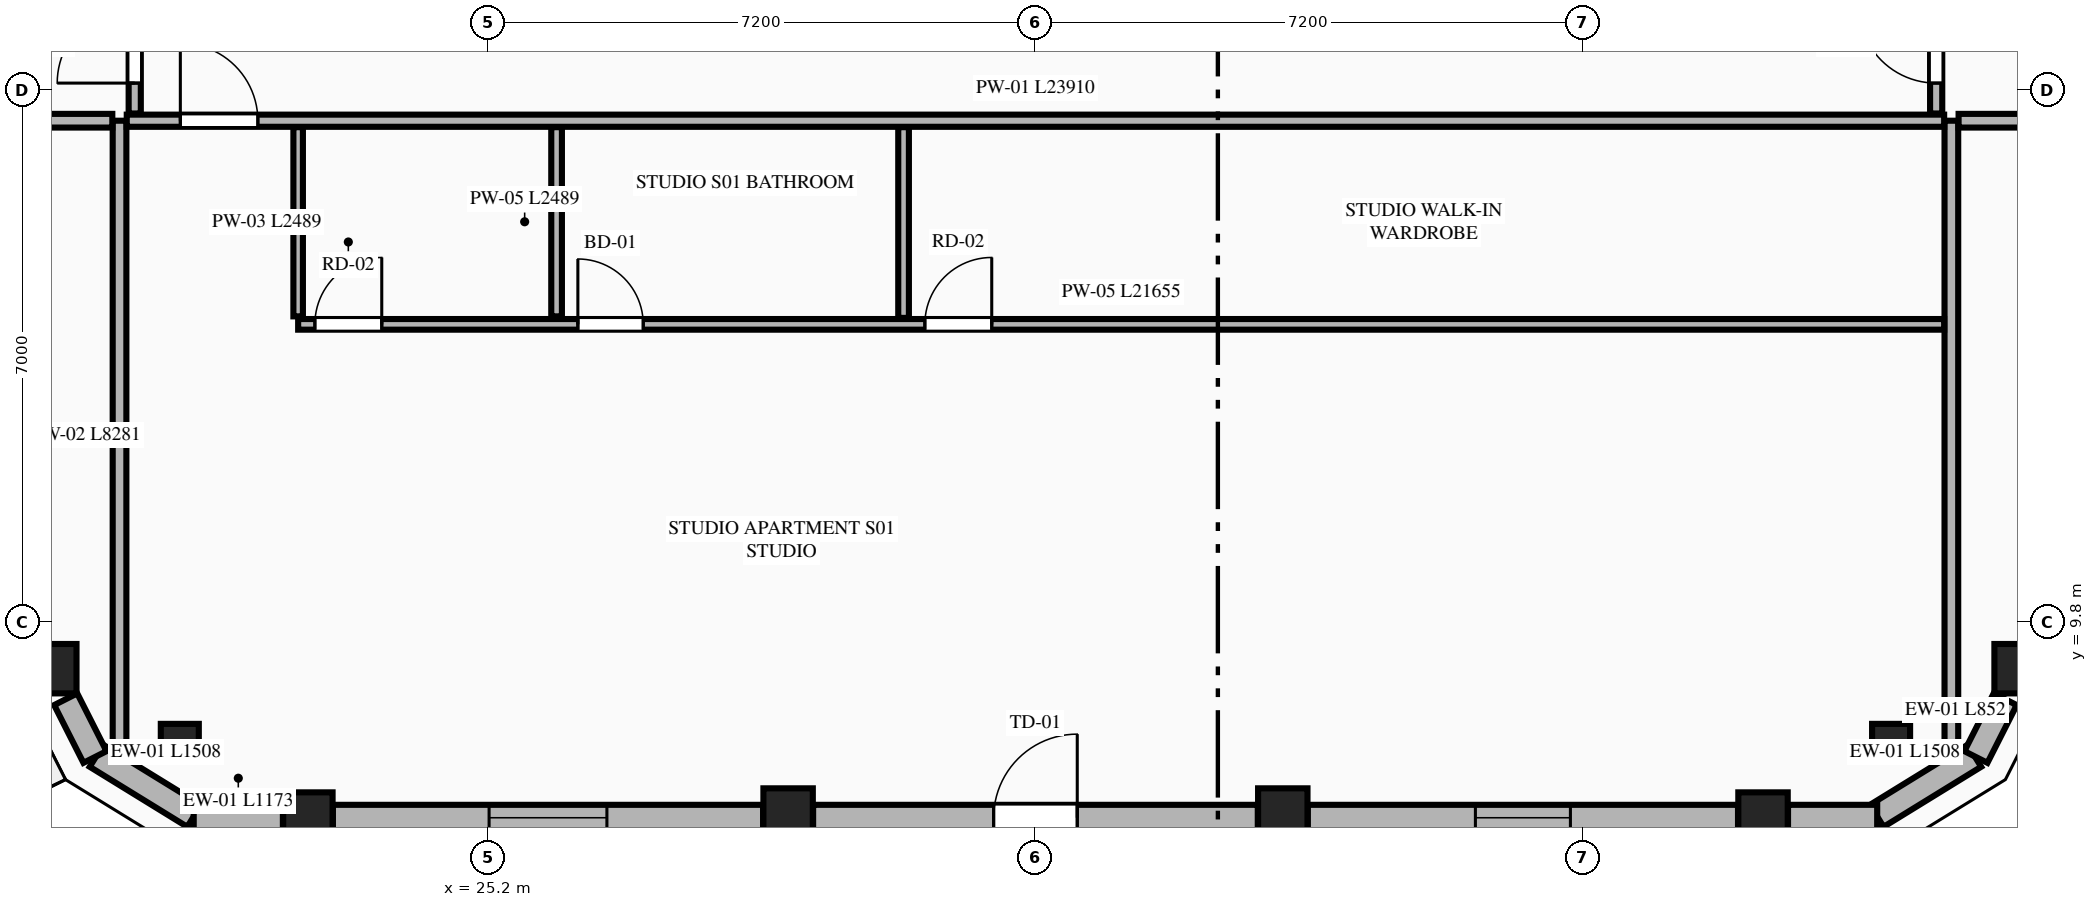
"""IFC4 building model, lengths in metres.
Left out: names, types, materials, properties, quantities, classifications, styles, units other than length and angle.
Written with IfcOpenShell. Run it as: python <this file> out.ifc"""

import sys

from ifc_helpers import new_model, si_unit, direction, frame, frame_2d, origin, origin_2d, place, context, subcontext, project, spatial, rectangle, extrude, element, fill, save


model = new_model("IFC4")
c1 = context("Model", 3, precision=1e-05, world=origin(), true_north=direction((0.0, 1.0)))
c2 = subcontext(c1, "Body", "Model", "MODEL_VIEW")
j1 = project(units=[si_unit("LENGTHUNIT", "METRE"), si_unit("PLANEANGLEUNIT", "RADIAN")], contexts=[c1])
p1 = place(None, origin())
s1 = spatial("IfcSite", under=j1, at=p1, CompositionType="ELEMENT")
p2 = place(p1, origin())
s2 = spatial("IfcBuilding", under=s1, at=p2, CompositionType="ELEMENT")
p3 = place(p2, frame((0.0, 0.0, 263.5)))
s3 = spatial("IfcBuildingStorey", under=s2, at=p3, CompositionType="ELEMENT", Elevation=263.5)
for number, where, z_axis, x_axis in (
    (1, (22.828, 7.239, 0.0), (0.0, 0.0, 1.0), (1.0, 0.0, 0.0)),
    (2, (29.146, 7.292, 0.0), (0.0, 0.0, 1.0), (1.0, 0.0, 0.0)),
    (3, (35.654, 7.292, 0.0), (0.0, 0.0, 1.0), (1.0, 0.0, 0.0)),
    (4, (41.972, 7.239, 0.0), (0.0, 0.0, 1.0), (1.0, 0.0, 0.0)),
    (5, (45.341, 9.191, 0.0), (0.0, 0.0, 1.0), (1.0, 0.0, 0.0)),
    (6, (19.459, 9.191, 0.0), (0.0, 0.0, 1.0), (1.0, 0.0, 0.0)),
):
    element("IfcColumn", number, at=place(p3, frame(where, z_axis=z_axis, x_axis=x_axis)), inside=s3, PredefinedType="COLUMN", context=c2, shape_type="SweptSolid", body=[
        extrude(rectangle(XDim=0.65, YDim=0.65, at=origin_2d()), origin(), (0.0, 0.0, 1.0), 3.65),
    ])
for number, where, z_axis, x_axis in (
    (7, (21.143, 8.215, 0.0), (0.0, 0.0, 1.0), (0.865, -0.501, 0.0)),
    (8, (43.657, 8.215, 0.0), (0.0, 0.0, 1.0), (0.865, 0.501, 0.0)),
):
    element("IfcColumn", number, at=place(p3, frame(where, z_axis=z_axis, x_axis=x_axis)), inside=s3, PredefinedType="PILASTER", context=c2, shape_type="SweptSolid", body=[
        extrude(rectangle(XDim=0.5, YDim=0.35, at=origin_2d()), origin(), (0.0, 0.0, 1.0), 3.65),
    ])
for number, where, z_axis, x_axis in (
    (9, (20.047, 8.045, 0.0), (0.0, 0.0, 1.0), (0.852, -0.524, 0.0)),
    (10, (43.469, 7.255, 0.0), (0.0, 0.0, 1.0), (0.852, 0.524, 0.0)),
):
    element("IfcWall", number, at=place(p3, frame(where, z_axis=z_axis, x_axis=x_axis)), inside=s3, PredefinedType="STANDARD", context=c2, shape_type="SweptSolid", body=[
        extrude(rectangle(XDim=1.508, YDim=0.34, at=frame_2d((0.754, 0.0))), origin(), (0.0, 0.0, 1.0), 3.45),
    ])
p4 = place(p3, frame((21.326, 7.23, 0.0), z_axis=(0.0, 0.0, 1.0), x_axis=(1.0, 0.0, 0.0)))
e11 = element("IfcWall", 11, at=p4, inside=s3, PredefinedType="STANDARD", context=c2, shape_type="SweptSolid", body=[
    extrude(rectangle(XDim=1.173, YDim=0.34, at=frame_2d((0.586, 0.0))), origin(), (0.0, 0.0, 1.0), 3.45),
])
p5 = place(p3, frame((23.157, 7.23, 0.0), z_axis=(0.0, 0.0, 1.0), x_axis=(1.0, 0.0, 0.0)))
e12 = element("IfcWall", 12, at=p5, inside=s3, PredefinedType="STANDARD", context=c2, shape_type="SweptSolid", body=[
    extrude(rectangle(XDim=5.66, YDim=0.34, at=frame_2d((2.83, 0.0))), origin(), (0.0, 0.0, 1.0), 2.983),
])
p6 = place(p5, frame((2.055, 0.0, 0.75)))
e13 = element("IfcOpeningElement", 13, at=p6, cuts=e12, PredefinedType="OPENING", context=c2, shape_type="SweptSolid", body=[
    extrude(rectangle(XDim=1.55, YDim=2.05, at=frame_2d((0.775, 1.025))), frame((0.0, 0.18, 0.0), z_axis=(0.0, -1.0, 0.0), x_axis=(1.0, 0.0, 0.0)), (0.0, 0.0, 1.0), 0.36),
])
p7 = place(p3, frame((29.475, 7.23, 0.0), z_axis=(0.0, 0.0, 1.0), x_axis=(1.0, 0.0, 0.0)))
e14 = element("IfcWall", 14, at=p7, inside=s3, PredefinedType="STANDARD", context=c2, shape_type="SweptSolid", body=[
    extrude(rectangle(XDim=5.85, YDim=0.34, at=frame_2d((2.925, 0.0))), origin(), (0.0, 0.0, 1.0), 2.983),
])
p8 = place(p7, frame((2.375, 0.0, 0.0)))
e15 = element("IfcOpeningElement", 15, at=p8, cuts=e14, PredefinedType="OPENING", context=c2, shape_type="SweptSolid", body=[
    extrude(rectangle(XDim=1.1, YDim=2.25, at=frame_2d((0.55, 1.125))), frame((0.0, 0.18, 0.0), z_axis=(0.0, -1.0, 0.0), x_axis=(1.0, 0.0, 0.0)), (0.0, 0.0, 1.0), 0.36),
])
p9 = place(p3, frame((35.983, 7.23, 0.0), z_axis=(0.0, 0.0, 1.0), x_axis=(1.0, 0.0, 0.0)))
e16 = element("IfcWall", 16, at=p9, inside=s3, PredefinedType="STANDARD", context=c2, shape_type="SweptSolid", body=[
    extrude(rectangle(XDim=5.66, YDim=0.34, at=frame_2d((2.83, 0.0))), origin(), (0.0, 0.0, 1.0), 2.983),
])
p10 = place(p9, frame((2.205, 0.0, 0.75)))
e17 = element("IfcOpeningElement", 17, at=p10, cuts=e16, PredefinedType="OPENING", context=c2, shape_type="SweptSolid", body=[
    extrude(rectangle(XDim=1.25, YDim=1.95, at=frame_2d((0.625, 0.975))), frame((0.0, 0.18, 0.0), z_axis=(0.0, -1.0, 0.0), x_axis=(1.0, 0.0, 0.0)), (0.0, 0.0, 1.0), 0.36),
])
p11 = place(p3, frame((42.301, 7.23, 0.0), z_axis=(0.0, 0.0, 1.0), x_axis=(1.0, 0.0, 0.0)))
e18 = element("IfcWall", 18, at=p11, inside=s3, PredefinedType="STANDARD", context=c2, shape_type="SweptSolid", body=[
    extrude(rectangle(XDim=1.173, YDim=0.34, at=frame_2d((0.586, 0.0))), origin(), (0.0, 0.0, 1.0), 3.45),
])
for number, where, z_axis, x_axis in (
    (19, (44.773, 8.029, 0.0), (0.0, 0.0, 1.0), (0.452, 0.892, 0.0)),
    (20, (19.642, 8.789, 0.0), (0.0, 0.0, 1.0), (0.452, -0.892, 0.0)),
):
    element("IfcWall", number, at=place(p3, frame(where, z_axis=z_axis, x_axis=x_axis)), inside=s3, PredefinedType="STANDARD", context=c2, shape_type="SweptSolid", body=[
        extrude(rectangle(XDim=0.852, YDim=0.34, at=frame_2d((0.426, 0.0))), origin(), (0.0, 0.0, 1.0), 3.45),
    ])
for number, where, z_axis, x_axis in (
    (21, (20.35, 8.119, 0.0), (0.0, 0.0, 1.0), (0.0, 1.0, 0.0)),
    (22, (44.45, 8.119, 0.0), (0.0, 0.0, 1.0), (0.0, 1.0, 0.0)),
):
    element("IfcWall", number, at=place(p3, frame(where, z_axis=z_axis, x_axis=x_axis)), inside=s3, PredefinedType="PARTITIONING", context=c2, shape_type="SweptSolid", body=[
        extrude(rectangle(XDim=8.281, YDim=0.18, at=frame_2d((4.141, 0.0))), origin(), (0.0, 0.0, 1.0), 3.45),
    ])
p12 = place(p3, frame((20.445, 16.4, 0.0), z_axis=(0.0, 0.0, 1.0), x_axis=(1.0, 0.0, 0.0)))
e23 = element("IfcWall", 23, at=p12, inside=s3, PredefinedType="PARTITIONING", context=c2, shape_type="SweptSolid", body=[
    extrude(rectangle(XDim=23.91, YDim=0.16, at=frame_2d((11.955, 0.0))), origin(), (0.0, 0.0, 1.0), 3.45),
])
p13 = place(p12, frame((0.705, 0.0, 0.0)))
e24 = element("IfcOpeningElement", 24, at=p13, cuts=e23, PredefinedType="OPENING", context=c2, shape_type="SweptSolid", body=[
    extrude(rectangle(XDim=1.02, YDim=2.25, at=frame_2d((0.51, 1.125))), frame((0.0, 0.09, 0.0), z_axis=(0.0, -1.0, 0.0), x_axis=(1.0, 0.0, 0.0)), (0.0, 0.0, 1.0), 0.18),
])
p14 = place(p3, frame((22.7, 13.826, 0.0), z_axis=(0.0, 0.0, 1.0), x_axis=(0.0, 1.0, 0.0)))
e25 = element("IfcWall", 25, at=p14, inside=s3, PredefinedType="PARTITIONING", context=c2, shape_type="SweptSolid", body=[
    extrude(rectangle(XDim=2.489, YDim=0.125, at=frame_2d((1.245, 0.0))), origin(), (0.0, 0.0, 1.0), 2.907),
])
p15 = place(p3, frame((22.7, 13.721, 0.0), z_axis=(0.0, 0.0, 1.0), x_axis=(1.0, 0.0, 0.0)))
e26 = element("IfcWall", 26, at=p15, inside=s3, PredefinedType="PLUMBINGWALL", context=c2, shape_type="SweptSolid", body=[
    extrude(rectangle(XDim=21.655, YDim=0.14, at=frame_2d((10.828, 0.0))), origin(), (0.0, 0.0, 1.0), 3.45),
])
p16 = place(p15, frame((3.68, 0.0, 0.0)))
e27 = element("IfcOpeningElement", 27, at=p16, cuts=e26, PredefinedType="OPENING", context=c2, shape_type="SweptSolid", body=[
    extrude(rectangle(XDim=0.86, YDim=2.1, at=frame_2d((0.43, 1.05))), frame((0.0, 0.08, 0.0), z_axis=(0.0, -1.0, 0.0), x_axis=(1.0, 0.0, 0.0)), (0.0, 0.0, 1.0), 0.16),
])
p17 = place(p15, frame((8.245, 0.0, 0.0)))
e28 = element("IfcOpeningElement", 28, at=p17, cuts=e26, PredefinedType="OPENING", context=c2, shape_type="SweptSolid", body=[
    extrude(rectangle(XDim=0.88, YDim=2.15, at=frame_2d((0.44, 1.075))), frame((0.0, 0.08, 0.0), z_axis=(0.0, -1.0, 0.0), x_axis=(1.0, 0.0, 0.0)), (0.0, 0.0, 1.0), 0.16),
])
p18 = place(p15, frame((0.22, 0.0, 0.0)))
e29 = element("IfcOpeningElement", 29, at=p18, cuts=e26, PredefinedType="OPENING", context=c2, shape_type="SweptSolid", body=[
    extrude(rectangle(XDim=0.88, YDim=2.15, at=frame_2d((0.44, 1.075))), frame((0.0, 0.08, 0.0), z_axis=(0.0, -1.0, 0.0), x_axis=(1.0, 0.0, 0.0)), (0.0, 0.0, 1.0), 0.16),
])
p19 = place(p3, frame((26.1, 13.826, 0.0), z_axis=(0.0, 0.0, 1.0), x_axis=(0.0, 1.0, 0.0)))
e30 = element("IfcWall", 30, at=p19, inside=s3, PredefinedType="PLUMBINGWALL", context=c2, shape_type="SweptSolid", body=[
    extrude(rectangle(XDim=2.489, YDim=0.14, at=frame_2d((1.245, 0.0))), origin(), (0.0, 0.0, 1.0), 3.45),
])
p20 = place(p3, frame((30.665, 13.806, 0.0), z_axis=(0.0, 0.0, 1.0), x_axis=(0.0, 1.0, 0.0)))
e31 = element("IfcWall", 31, at=p20, inside=s3, PredefinedType="PLUMBINGWALL", context=c2, shape_type="SweptSolid", body=[
    extrude(rectangle(XDim=2.509, YDim=0.14, at=frame_2d((1.254, 0.0))), origin(), (0.0, 0.0, 1.0), 3.45),
])
p21 = place(p3, frame((16.034, 16.4, 0.0), z_axis=(0.0, 0.0, 1.0), x_axis=(1.0, 0.0, 0.0)))
e32 = element("IfcWall", 32, at=p21, inside=s3, PredefinedType="PARTITIONING", context=c2, shape_type="SweptSolid", body=[
    extrude(rectangle(XDim=4.221, YDim=0.18, at=frame_2d((2.11, 0.0))), origin(), (0.0, 0.0, 1.0), 3.45),
])
p22 = place(p3, frame((44.545, 16.4, 0.0), z_axis=(0.0, 0.0, 1.0), x_axis=(1.0, 0.0, 0.0)))
e33 = element("IfcWall", 33, at=p22, inside=s3, PredefinedType="PARTITIONING", context=c2, shape_type="SweptSolid", body=[
    extrude(rectangle(XDim=4.221, YDim=0.18, at=frame_2d((2.111, 0.0))), origin(), (0.0, 0.0, 1.0), 3.45),
])
p23 = place(p3, frame((20.55, 16.495, 0.0), z_axis=(0.0, 0.0, 1.0), x_axis=(0.0, 1.0, 0.0)))
e34 = element("IfcWall", 34, at=p23, inside=s3, PredefinedType="PARTITIONING", context=c2, shape_type="SweptSolid", body=[
    extrude(rectangle(XDim=18.41, YDim=0.16, at=frame_2d((9.205, 0.0))), origin(), (0.0, 0.0, 1.0), 3.137),
])
p24 = place(p23, frame((0.4, 0.0, 0.0)))
e35 = element("IfcOpeningElement", 35, at=p24, cuts=e34, PredefinedType="OPENING", context=c2, shape_type="SweptSolid", body=[
    extrude(rectangle(XDim=1.02, YDim=2.25, at=frame_2d((0.51, 1.125))), frame((0.0, 0.09, 0.0), z_axis=(0.0, -1.0, 0.0), x_axis=(1.0, 0.0, 0.0)), (0.0, 0.0, 1.0), 0.18),
])
p25 = place(p3, frame((44.25, 16.495, 0.0), z_axis=(0.0, 0.0, 1.0), x_axis=(0.0, 1.0, 0.0)))
e36 = element("IfcWall", 36, at=p25, inside=s3, PredefinedType="PARTITIONING", context=c2, shape_type="SweptSolid", body=[
    extrude(rectangle(XDim=18.41, YDim=0.16, at=frame_2d((9.205, 0.0))), origin(), (0.0, 0.0, 1.0), 3.137),
])
p26 = place(p25, frame((0.4, 0.0, 0.0)))
e37 = element("IfcOpeningElement", 37, at=p26, cuts=e36, PredefinedType="OPENING", context=c2, shape_type="SweptSolid", body=[
    extrude(rectangle(XDim=1.02, YDim=2.25, at=frame_2d((0.51, 1.125))), frame((0.0, 0.09, 0.0), z_axis=(0.0, -1.0, 0.0), x_axis=(1.0, 0.0, 0.0)), (0.0, 0.0, 1.0), 0.18),
])
p27 = place(p6, origin())
e38 = element("IfcWindow", 38, at=p27, inside=s3, PartitioningType="SINGLE_PANEL", PredefinedType="WINDOW", context=c2, shape_type="SweptSolid", body=[
    extrude(rectangle(XDim=1.55, YDim=2.05, at=frame_2d((0.775, 1.025))), frame((0.0, 0.03, 0.0), z_axis=(0.0, -1.0, 0.0), x_axis=(1.0, 0.0, 0.0)), (0.0, 0.0, 1.0), 0.06),
])
fill(e13, e38)
p28 = place(p8, origin())
e39 = element("IfcDoor", 39, at=p28, inside=s3, OperationType="SINGLE_SWING_RIGHT", PredefinedType="DOOR", context=c2, shape_type="SweptSolid", body=[
    extrude(rectangle(XDim=1.1, YDim=2.25, at=frame_2d((0.55, 1.125))), frame((0.0, 0.025, 0.0), z_axis=(0.0, -1.0, 0.0), x_axis=(1.0, 0.0, 0.0)), (0.0, 0.0, 1.0), 0.05),
])
fill(e15, e39)
p29 = place(p10, origin())
e40 = element("IfcWindow", 40, at=p29, inside=s3, PartitioningType="SINGLE_PANEL", PredefinedType="WINDOW", context=c2, shape_type="SweptSolid", body=[
    extrude(rectangle(XDim=1.25, YDim=1.95, at=frame_2d((0.625, 0.975))), frame((0.0, 0.03, 0.0), z_axis=(0.0, -1.0, 0.0), x_axis=(1.0, 0.0, 0.0)), (0.0, 0.0, 1.0), 0.06),
])
fill(e17, e40)
p30 = place(p16, origin())
e41 = element("IfcDoor", 41, at=p30, inside=s3, OperationType="SINGLE_SWING_LEFT", PredefinedType="DOOR", context=c2, shape_type="SweptSolid", body=[
    extrude(rectangle(XDim=0.86, YDim=2.1, at=frame_2d((0.43, 1.05))), frame((0.0, 0.025, 0.0), z_axis=(0.0, -1.0, 0.0), x_axis=(1.0, 0.0, 0.0)), (0.0, 0.0, 1.0), 0.05),
])
fill(e27, e41)
p31 = place(p17, origin())
e42 = element("IfcDoor", 42, at=p31, inside=s3, OperationType="SINGLE_SWING_RIGHT", PredefinedType="DOOR", context=c2, shape_type="SweptSolid", body=[
    extrude(rectangle(XDim=0.88, YDim=2.15, at=frame_2d((0.44, 1.075))), frame((0.0, 0.025, 0.0), z_axis=(0.0, -1.0, 0.0), x_axis=(1.0, 0.0, 0.0)), (0.0, 0.0, 1.0), 0.05),
])
fill(e28, e42)
p32 = place(p13, origin())
e43 = element("IfcDoor", 43, at=p32, inside=s3, OperationType="SINGLE_SWING_LEFT", PredefinedType="DOOR", context=c2, shape_type="SweptSolid", body=[
    extrude(rectangle(XDim=1.02, YDim=2.25, at=frame_2d((0.51, 1.125))), frame((0.0, 0.025, 0.0), z_axis=(0.0, -1.0, 0.0), x_axis=(1.0, 0.0, 0.0)), (0.0, 0.0, 1.0), 0.05),
])
fill(e24, e43)
p33 = place(p18, origin())
e44 = element("IfcDoor", 44, at=p33, inside=s3, OperationType="SINGLE_SWING_RIGHT", PredefinedType="DOOR", context=c2, shape_type="SweptSolid", body=[
    extrude(rectangle(XDim=0.88, YDim=2.15, at=frame_2d((0.44, 1.075))), frame((0.0, 0.025, 0.0), z_axis=(0.0, -1.0, 0.0), x_axis=(1.0, 0.0, 0.0)), (0.0, 0.0, 1.0), 0.05),
])
fill(e29, e44)
p34 = place(p24, origin())
e45 = element("IfcDoor", 45, at=p34, inside=s3, OperationType="SINGLE_SWING_LEFT", PredefinedType="DOOR", context=c2, shape_type="SweptSolid", body=[
    extrude(rectangle(XDim=1.02, YDim=2.25, at=frame_2d((0.51, 1.125))), frame((0.0, 0.025, 0.0), z_axis=(0.0, -1.0, 0.0), x_axis=(1.0, 0.0, 0.0)), (0.0, 0.0, 1.0), 0.05),
])
fill(e35, e45)
p35 = place(p26, origin())
e46 = element("IfcDoor", 46, at=p35, inside=s3, OperationType="SINGLE_SWING_RIGHT", PredefinedType="DOOR", context=c2, shape_type="SweptSolid", body=[
    extrude(rectangle(XDim=1.02, YDim=2.25, at=frame_2d((0.51, 1.125))), frame((0.0, 0.025, 0.0), z_axis=(0.0, -1.0, 0.0), x_axis=(1.0, 0.0, 0.0)), (0.0, 0.0, 1.0), 0.05),
])
fill(e37, e46)
save(model, sys.argv[1])
